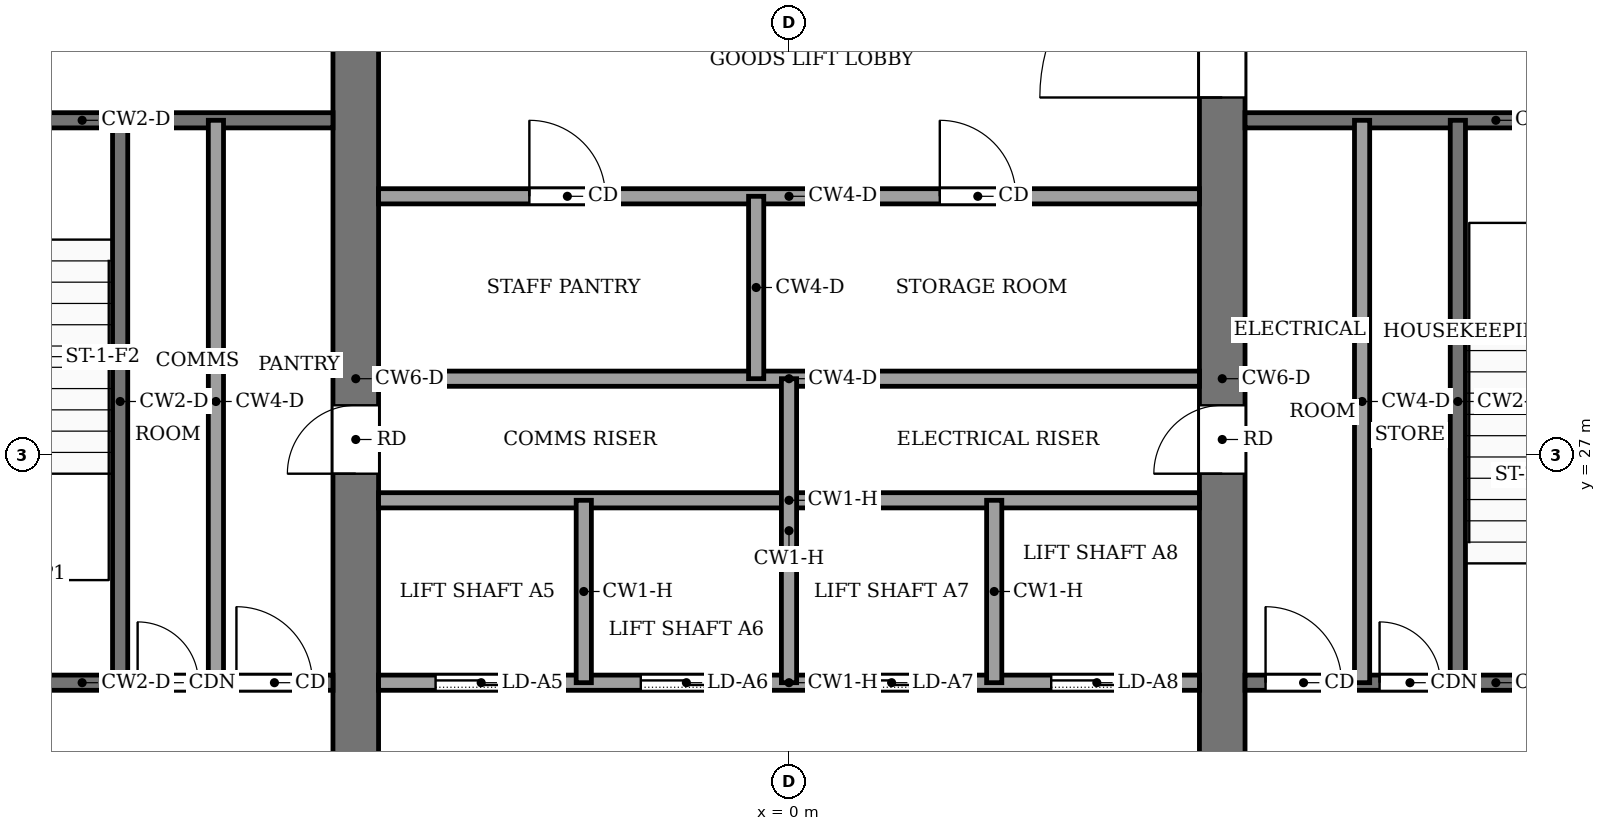
"""IFC4 building model, lengths in metres.
Left out: names, types, materials, properties, quantities, classifications, styles, units other than length and angle.
Written with IfcOpenShell. Run it as: python <this file> out.ifc"""

import sys

from ifc_helpers import new_model, si_unit, direction, frame, frame_2d, origin, place, context, subcontext, project, spatial, rectangle, extrude, element, fill, save


model = new_model("IFC4")
c1 = context("Model", 3, precision=1e-05, world=origin(), true_north=direction((0.0, 1.0)))
c2 = subcontext(c1, "Body", "Model", "MODEL_VIEW")
j1 = project(units=[si_unit("LENGTHUNIT", "METRE"), si_unit("PLANEANGLEUNIT", "RADIAN")], contexts=[c1])
p1 = place(None, origin())
s1 = spatial("IfcSite", under=j1, at=p1, CompositionType="ELEMENT")
p2 = place(p1, origin())
s2 = spatial("IfcBuilding", under=s1, at=p2, CompositionType="ELEMENT")
p3 = place(p2, frame((0.0, 0.0, 278.0)))
s3 = spatial("IfcBuildingStorey", under=s2, at=p3, CompositionType="ELEMENT", Elevation=278.0)
p4 = place(p3, frame((-5.7, 18.4, -0.13), z_axis=(0.0, 0.0, 1.0), x_axis=(0.0, 1.0, 0.0)))
e1 = element("IfcWall", 1, at=p4, inside=s3, PredefinedType="SHEAR", context=c2, shape_type="SweptSolid", body=[
    extrude(rectangle(XDim=19.2, YDim=0.6, at=frame_2d((9.6, 0.0))), origin(), (0.0, 0.0, 1.0), 3.88),
])
p5 = place(p4, frame((8.35, 0.0, 0.13)))
e2 = element("IfcOpeningElement", 2, at=p5, cuts=e1, PredefinedType="OPENING", context=c2, shape_type="SweptSolid", body=[
    extrude(rectangle(XDim=0.9, YDim=2.1, at=frame_2d((0.45, 1.05))), frame((0.0, 0.31, 0.0), z_axis=(0.0, -1.0, 0.0), x_axis=(1.0, 0.0, 0.0)), (0.0, 0.0, 1.0), 0.62),
])
p6 = place(p3, frame((5.7, 18.4, -0.13), z_axis=(0.0, 0.0, 1.0), x_axis=(0.0, 1.0, 0.0)))
e3 = element("IfcWall", 3, at=p6, inside=s3, PredefinedType="SHEAR", context=c2, shape_type="SweptSolid", body=[
    extrude(rectangle(XDim=19.2, YDim=0.6, at=frame_2d((9.6, 0.0))), origin(), (0.0, 0.0, 1.0), 3.88),
])
p7 = place(p6, frame((8.35, 0.0, 0.13)))
e4 = element("IfcOpeningElement", 4, at=p7, cuts=e3, PredefinedType="OPENING", context=c2, shape_type="SweptSolid", body=[
    extrude(rectangle(XDim=0.9, YDim=2.1, at=frame_2d((0.45, 1.05))), frame((0.0, 0.31, 0.0), z_axis=(0.0, -1.0, 0.0), x_axis=(1.0, 0.0, 0.0)), (0.0, 0.0, 1.0), 0.62),
])
p8 = place(p6, frame((13.3, 0.0, 0.13)))
e5 = element("IfcOpeningElement", 5, at=p8, cuts=e3, PredefinedType="OPENING", context=c2, shape_type="SweptSolid", body=[
    extrude(rectangle(XDim=2.4, YDim=2.4, at=frame_2d((1.2, 1.2))), frame((0.0, 0.31, 0.0), z_axis=(0.0, -1.0, 0.0), x_axis=(1.0, 0.0, 0.0)), (0.0, 0.0, 1.0), 0.62),
])
p9 = place(p3, frame((-12.6, 24.0, 0.0), z_axis=(0.0, 0.0, 1.0), x_axis=(1.0, 0.0, 0.0)))
e6 = element("IfcWall", 6, at=p9, inside=s3, PredefinedType="PARTITIONING", context=c2, shape_type="SweptSolid", body=[
    extrude(rectangle(XDim=6.6, YDim=0.2, at=frame_2d((3.3, 0.0))), origin(), (0.0, 0.0, 1.0), 3.75),
])
p10 = place(p9, frame((4.03, 0.0, 0.0)))
e7 = element("IfcOpeningElement", 7, at=p10, cuts=e6, PredefinedType="OPENING", context=c2, shape_type="SweptSolid", body=[
    extrude(rectangle(XDim=0.8, YDim=2.1, at=frame_2d((0.4, 1.05))), frame((0.0, 0.11, 0.0), z_axis=(0.0, -1.0, 0.0), x_axis=(1.0, 0.0, 0.0)), (0.0, 0.0, 1.0), 0.22),
])
p11 = place(p9, frame((5.33, 0.0, 0.0)))
e8 = element("IfcOpeningElement", 8, at=p11, cuts=e6, PredefinedType="OPENING", context=c2, shape_type="SweptSolid", body=[
    extrude(rectangle(XDim=1.0, YDim=2.1, at=frame_2d((0.5, 1.05))), frame((0.0, 0.11, 0.0), z_axis=(0.0, -1.0, 0.0), x_axis=(1.0, 0.0, 0.0)), (0.0, 0.0, 1.0), 0.22),
])
p12 = place(p3, frame((-5.4, 24.0, 0.0), z_axis=(0.0, 0.0, 1.0), x_axis=(1.0, 0.0, 0.0)))
e9 = element("IfcWall", 9, at=p12, inside=s3, PredefinedType="PARTITIONING", context=c2, shape_type="SweptSolid", body=[
    extrude(rectangle(XDim=10.8, YDim=0.2, at=frame_2d((5.4, 0.0))), origin(), (0.0, 0.0, 1.0), 3.75),
])
p13 = place(p12, frame((0.75, 0.0, 0.0)))
e10 = element("IfcOpeningElement", 10, at=p13, cuts=e9, PredefinedType="OPENING", context=c2, shape_type="SweptSolid", body=[
    extrude(rectangle(XDim=1.2, YDim=2.2, at=frame_2d((0.6, 1.1))), frame((0.0, 0.11, 0.0), z_axis=(0.0, -1.0, 0.0), x_axis=(1.0, 0.0, 0.0)), (0.0, 0.0, 1.0), 0.22),
])
p14 = place(p12, frame((3.45, 0.0, 0.0)))
e11 = element("IfcOpeningElement", 11, at=p14, cuts=e9, PredefinedType="OPENING", context=c2, shape_type="SweptSolid", body=[
    extrude(rectangle(XDim=1.2, YDim=2.2, at=frame_2d((0.6, 1.1))), frame((0.0, 0.11, 0.0), z_axis=(0.0, -1.0, 0.0), x_axis=(1.0, 0.0, 0.0)), (0.0, 0.0, 1.0), 0.22),
])
p15 = place(p12, frame((6.15, 0.0, 0.0)))
e12 = element("IfcOpeningElement", 12, at=p15, cuts=e9, PredefinedType="OPENING", context=c2, shape_type="SweptSolid", body=[
    extrude(rectangle(XDim=1.2, YDim=2.2, at=frame_2d((0.6, 1.1))), frame((0.0, 0.11, 0.0), z_axis=(0.0, -1.0, 0.0), x_axis=(1.0, 0.0, 0.0)), (0.0, 0.0, 1.0), 0.22),
])
p16 = place(p12, frame((8.85, 0.0, 0.0)))
e13 = element("IfcOpeningElement", 13, at=p16, cuts=e9, PredefinedType="OPENING", context=c2, shape_type="SweptSolid", body=[
    extrude(rectangle(XDim=1.2, YDim=2.2, at=frame_2d((0.6, 1.1))), frame((0.0, 0.11, 0.0), z_axis=(0.0, -1.0, 0.0), x_axis=(1.0, 0.0, 0.0)), (0.0, 0.0, 1.0), 0.22),
])
p17 = place(p3, frame((6.0, 24.0, 0.0), z_axis=(0.0, 0.0, 1.0), x_axis=(1.0, 0.0, 0.0)))
e14 = element("IfcWall", 14, at=p17, inside=s3, PredefinedType="PARTITIONING", context=c2, shape_type="SweptSolid", body=[
    extrude(rectangle(XDim=6.6, YDim=0.2, at=frame_2d((3.3, 0.0))), origin(), (0.0, 0.0, 1.0), 3.75),
])
p18 = place(p17, frame((0.27, 0.0, 0.0)))
e15 = element("IfcOpeningElement", 15, at=p18, cuts=e14, PredefinedType="OPENING", context=c2, shape_type="SweptSolid", body=[
    extrude(rectangle(XDim=1.0, YDim=2.1, at=frame_2d((0.5, 1.05))), frame((0.0, 0.11, 0.0), z_axis=(0.0, -1.0, 0.0), x_axis=(1.0, 0.0, 0.0)), (0.0, 0.0, 1.0), 0.22),
])
p19 = place(p17, frame((1.77, 0.0, 0.0)))
e16 = element("IfcOpeningElement", 16, at=p19, cuts=e14, PredefinedType="OPENING", context=c2, shape_type="SweptSolid", body=[
    extrude(rectangle(XDim=0.8, YDim=2.1, at=frame_2d((0.4, 1.05))), frame((0.0, 0.11, 0.0), z_axis=(0.0, -1.0, 0.0), x_axis=(1.0, 0.0, 0.0)), (0.0, 0.0, 1.0), 0.22),
])
p20 = place(p17, frame((4.4, 0.0, 0.0)))
e17 = element("IfcOpeningElement", 17, at=p20, cuts=e14, PredefinedType="OPENING", context=c2, shape_type="SweptSolid", body=[
    extrude(rectangle(XDim=1.2, YDim=2.2, at=frame_2d((0.6, 1.1))), frame((0.0, 0.11, 0.0), z_axis=(0.0, -1.0, 0.0), x_axis=(1.0, 0.0, 0.0)), (0.0, 0.0, 1.0), 0.22),
])
for number, where, z_axis, x_axis in (
    (18, (-5.4, 26.4, 0.0), (0.0, 0.0, 1.0), (1.0, 0.0, 0.0)),
    (19, (-5.4, 28.0, 0.0), (0.0, 0.0, 1.0), (1.0, 0.0, 0.0)),
):
    element("IfcWall", number, at=place(p3, frame(where, z_axis=z_axis, x_axis=x_axis)), inside=s3, PredefinedType="PARTITIONING", context=c2, shape_type="SweptSolid", body=[
        extrude(rectangle(XDim=10.8, YDim=0.2, at=frame_2d((5.4, 0.0))), origin(), (0.0, 0.0, 1.0), 3.75),
    ])
p21 = place(p3, frame((-5.4, 30.4, 0.0), z_axis=(0.0, 0.0, 1.0), x_axis=(1.0, 0.0, 0.0)))
e20 = element("IfcWall", 20, at=p21, inside=s3, PredefinedType="PARTITIONING", context=c2, shape_type="SweptSolid", body=[
    extrude(rectangle(XDim=10.8, YDim=0.2, at=frame_2d((5.4, 0.0))), origin(), (0.0, 0.0, 1.0), 3.75),
])
p22 = place(p21, frame((1.984, 0.0, 0.0)))
e21 = element("IfcOpeningElement", 21, at=p22, cuts=e20, PredefinedType="OPENING", context=c2, shape_type="SweptSolid", body=[
    extrude(rectangle(XDim=1.0, YDim=2.1, at=frame_2d((0.5, 1.05))), frame((0.0, 0.11, 0.0), z_axis=(0.0, -1.0, 0.0), x_axis=(1.0, 0.0, 0.0)), (0.0, 0.0, 1.0), 0.22),
])
p23 = place(p21, frame((7.384, 0.0, 0.0)))
e22 = element("IfcOpeningElement", 22, at=p23, cuts=e20, PredefinedType="OPENING", context=c2, shape_type="SweptSolid", body=[
    extrude(rectangle(XDim=1.0, YDim=2.1, at=frame_2d((0.5, 1.05))), frame((0.0, 0.11, 0.0), z_axis=(0.0, -1.0, 0.0), x_axis=(1.0, 0.0, 0.0)), (0.0, 0.0, 1.0), 0.22),
])
p24 = place(p3, frame((-12.6, 31.4, 0.0), z_axis=(0.0, 0.0, 1.0), x_axis=(1.0, 0.0, 0.0)))
e23 = element("IfcWall", 23, at=p24, inside=s3, PredefinedType="PARTITIONING", context=c2, shape_type="SweptSolid", body=[
    extrude(rectangle(XDim=6.6, YDim=0.2, at=frame_2d((3.3, 0.0))), origin(), (0.0, 0.0, 1.0), 3.75),
])
p25 = place(p24, frame((1.0, 0.0, 0.0)))
e24 = element("IfcOpeningElement", 24, at=p25, cuts=e23, PredefinedType="OPENING", context=c2, shape_type="SweptSolid", body=[
    extrude(rectangle(XDim=1.2, YDim=2.2, at=frame_2d((0.6, 1.1))), frame((0.0, 0.11, 0.0), z_axis=(0.0, -1.0, 0.0), x_axis=(1.0, 0.0, 0.0)), (0.0, 0.0, 1.0), 0.22),
])
p26 = place(p3, frame((6.0, 31.4, 0.0), z_axis=(0.0, 0.0, 1.0), x_axis=(1.0, 0.0, 0.0)))
e25 = element("IfcWall", 25, at=p26, inside=s3, PredefinedType="PARTITIONING", context=c2, shape_type="SweptSolid", body=[
    extrude(rectangle(XDim=6.6, YDim=0.2, at=frame_2d((3.3, 0.0))), origin(), (0.0, 0.0, 1.0), 3.75),
])
for number, where, z_axis, x_axis in (
    (26, (-8.8, 24.0, 0.0), (0.0, 0.0, 1.0), (0.0, 1.0, 0.0)),
    (27, (-7.54, 24.0, 0.0), (0.0, 0.0, 1.0), (0.0, 1.0, 0.0)),
):
    element("IfcWall", number, at=place(p3, frame(where, z_axis=z_axis, x_axis=x_axis)), inside=s3, PredefinedType="PARTITIONING", context=c2, shape_type="SweptSolid", body=[
        extrude(rectangle(XDim=7.4, YDim=0.2, at=frame_2d((3.7, 0.0))), origin(), (0.0, 0.0, 1.0), 3.75),
    ])
for number, where, z_axis, x_axis in (
    (28, (-2.7, 24.0, 0.0), (0.0, 0.0, 1.0), (0.0, 1.0, 0.0)),
    (29, (-0.432, 28.0, 0.0), (0.0, 0.0, 1.0), (0.0, 1.0, 0.0)),
):
    element("IfcWall", number, at=place(p3, frame(where, z_axis=z_axis, x_axis=x_axis)), inside=s3, PredefinedType="PARTITIONING", context=c2, shape_type="SweptSolid", body=[
        extrude(rectangle(XDim=2.4, YDim=0.2, at=frame_2d((1.2, 0.0))), origin(), (0.0, 0.0, 1.0), 3.75),
    ])
p27 = place(p3, frame((0.0, 24.0, 0.0), z_axis=(0.0, 0.0, 1.0), x_axis=(0.0, 1.0, 0.0)))
e30 = element("IfcWall", 30, at=p27, inside=s3, PredefinedType="PARTITIONING", context=c2, shape_type="SweptSolid", body=[
    extrude(rectangle(XDim=4.0, YDim=0.2, at=frame_2d((2.0, 0.0))), origin(), (0.0, 0.0, 1.0), 3.75),
])
p28 = place(p3, frame((2.7, 24.0, 0.0), z_axis=(0.0, 0.0, 1.0), x_axis=(0.0, 1.0, 0.0)))
e31 = element("IfcWall", 31, at=p28, inside=s3, PredefinedType="PARTITIONING", context=c2, shape_type="SweptSolid", body=[
    extrude(rectangle(XDim=2.4, YDim=0.2, at=frame_2d((1.2, 0.0))), origin(), (0.0, 0.0, 1.0), 3.75),
])
for number, where, z_axis, x_axis in (
    (32, (7.54, 24.0, 0.0), (0.0, 0.0, 1.0), (0.0, 1.0, 0.0)),
    (33, (8.8, 24.0, 0.0), (0.0, 0.0, 1.0), (0.0, 1.0, 0.0)),
):
    element("IfcWall", number, at=place(p3, frame(where, z_axis=z_axis, x_axis=x_axis)), inside=s3, PredefinedType="PARTITIONING", context=c2, shape_type="SweptSolid", body=[
        extrude(rectangle(XDim=7.4, YDim=0.2, at=frame_2d((3.7, 0.0))), origin(), (0.0, 0.0, 1.0), 3.75),
    ])
p29 = place(p13, origin())
e34 = element("IfcDoor", 34, at=p29, inside=s3, OperationType="SLIDING_TO_LEFT", PredefinedType="DOOR", context=c2, shape_type="SweptSolid", body=[
    extrude(rectangle(XDim=1.2, YDim=2.2, at=frame_2d((0.6, 1.1))), frame((0.0, 0.025, 0.0), z_axis=(0.0, -1.0, 0.0), x_axis=(1.0, 0.0, 0.0)), (0.0, 0.0, 1.0), 0.05),
])
fill(e10, e34)
p30 = place(p14, origin())
e35 = element("IfcDoor", 35, at=p30, inside=s3, OperationType="SLIDING_TO_LEFT", PredefinedType="DOOR", context=c2, shape_type="SweptSolid", body=[
    extrude(rectangle(XDim=1.2, YDim=2.2, at=frame_2d((0.6, 1.1))), frame((0.0, 0.025, 0.0), z_axis=(0.0, -1.0, 0.0), x_axis=(1.0, 0.0, 0.0)), (0.0, 0.0, 1.0), 0.05),
])
fill(e11, e35)
p31 = place(p15, origin())
e36 = element("IfcDoor", 36, at=p31, inside=s3, OperationType="SLIDING_TO_LEFT", PredefinedType="DOOR", context=c2, shape_type="SweptSolid", body=[
    extrude(rectangle(XDim=1.2, YDim=2.2, at=frame_2d((0.6, 1.1))), frame((0.0, 0.025, 0.0), z_axis=(0.0, -1.0, 0.0), x_axis=(1.0, 0.0, 0.0)), (0.0, 0.0, 1.0), 0.05),
])
fill(e12, e36)
p32 = place(p16, origin())
e37 = element("IfcDoor", 37, at=p32, inside=s3, OperationType="SLIDING_TO_LEFT", PredefinedType="DOOR", context=c2, shape_type="SweptSolid", body=[
    extrude(rectangle(XDim=1.2, YDim=2.2, at=frame_2d((0.6, 1.1))), frame((0.0, 0.025, 0.0), z_axis=(0.0, -1.0, 0.0), x_axis=(1.0, 0.0, 0.0)), (0.0, 0.0, 1.0), 0.05),
])
fill(e13, e37)
p33 = place(p22, origin())
e38 = element("IfcDoor", 38, at=p33, inside=s3, OperationType="SINGLE_SWING_LEFT", PredefinedType="DOOR", context=c2, shape_type="SweptSolid", body=[
    extrude(rectangle(XDim=1.0, YDim=2.1, at=frame_2d((0.5, 1.05))), frame((0.0, 0.025, 0.0), z_axis=(0.0, -1.0, 0.0), x_axis=(1.0, 0.0, 0.0)), (0.0, 0.0, 1.0), 0.05),
])
fill(e21, e38)
p34 = place(p23, origin())
e39 = element("IfcDoor", 39, at=p34, inside=s3, OperationType="SINGLE_SWING_RIGHT", PredefinedType="DOOR", context=c2, shape_type="SweptSolid", body=[
    extrude(rectangle(XDim=1.0, YDim=2.1, at=frame_2d((0.5, 1.05))), frame((0.0, 0.025, 0.0), z_axis=(0.0, -1.0, 0.0), x_axis=(1.0, 0.0, 0.0)), (0.0, 0.0, 1.0), 0.05),
])
fill(e22, e39)
p35 = place(p10, origin())
e40 = element("IfcDoor", 40, at=p35, inside=s3, OperationType="SINGLE_SWING_RIGHT", PredefinedType="DOOR", context=c2, shape_type="SweptSolid", body=[
    extrude(rectangle(XDim=0.8, YDim=2.1, at=frame_2d((0.4, 1.05))), frame((0.0, 0.025, 0.0), z_axis=(0.0, -1.0, 0.0), x_axis=(1.0, 0.0, 0.0)), (0.0, 0.0, 1.0), 0.05),
])
fill(e7, e40)
p36 = place(p11, origin())
e41 = element("IfcDoor", 41, at=p36, inside=s3, OperationType="SINGLE_SWING_LEFT", PredefinedType="DOOR", context=c2, shape_type="SweptSolid", body=[
    extrude(rectangle(XDim=1.0, YDim=2.1, at=frame_2d((0.5, 1.05))), frame((0.0, 0.025, 0.0), z_axis=(0.0, -1.0, 0.0), x_axis=(1.0, 0.0, 0.0)), (0.0, 0.0, 1.0), 0.05),
])
fill(e8, e41)
p37 = place(p18, origin())
e42 = element("IfcDoor", 42, at=p37, inside=s3, OperationType="SINGLE_SWING_RIGHT", PredefinedType="DOOR", context=c2, shape_type="SweptSolid", body=[
    extrude(rectangle(XDim=1.0, YDim=2.1, at=frame_2d((0.5, 1.05))), frame((0.0, 0.025, 0.0), z_axis=(0.0, -1.0, 0.0), x_axis=(1.0, 0.0, 0.0)), (0.0, 0.0, 1.0), 0.05),
])
fill(e15, e42)
p38 = place(p19, origin())
e43 = element("IfcDoor", 43, at=p38, inside=s3, OperationType="SINGLE_SWING_LEFT", PredefinedType="DOOR", context=c2, shape_type="SweptSolid", body=[
    extrude(rectangle(XDim=0.8, YDim=2.1, at=frame_2d((0.4, 1.05))), frame((0.0, 0.025, 0.0), z_axis=(0.0, -1.0, 0.0), x_axis=(1.0, 0.0, 0.0)), (0.0, 0.0, 1.0), 0.05),
])
fill(e16, e43)
p39 = place(p5, origin())
e44 = element("IfcDoor", 44, at=p39, inside=s3, OperationType="SINGLE_SWING_RIGHT", PredefinedType="DOOR", context=c2, shape_type="SweptSolid", body=[
    extrude(rectangle(XDim=0.9, YDim=2.1, at=frame_2d((0.45, 1.05))), frame((0.0, 0.025, 0.0), z_axis=(0.0, -1.0, 0.0), x_axis=(1.0, 0.0, 0.0)), (0.0, 0.0, 1.0), 0.05),
])
fill(e2, e44)
p40 = place(p7, origin())
e45 = element("IfcDoor", 45, at=p40, inside=s3, OperationType="SINGLE_SWING_LEFT", PredefinedType="DOOR", context=c2, shape_type="SweptSolid", body=[
    extrude(rectangle(XDim=0.9, YDim=2.1, at=frame_2d((0.45, 1.05))), frame((0.0, 0.025, 0.0), z_axis=(0.0, -1.0, 0.0), x_axis=(1.0, 0.0, 0.0)), (0.0, 0.0, 1.0), 0.05),
])
fill(e4, e45)
p41 = place(p8, origin())
e46 = element("IfcDoor", 46, at=p41, inside=s3, OperationType="DOUBLE_DOOR_SINGLE_SWING", PredefinedType="DOOR", context=c2, shape_type="SweptSolid", body=[
    extrude(rectangle(XDim=2.4, YDim=2.4, at=frame_2d((1.2, 1.2))), frame((0.0, 0.025, 0.0), z_axis=(0.0, -1.0, 0.0), x_axis=(1.0, 0.0, 0.0)), (0.0, 0.0, 1.0), 0.05),
])
fill(e5, e46)
save(model, sys.argv[1])
